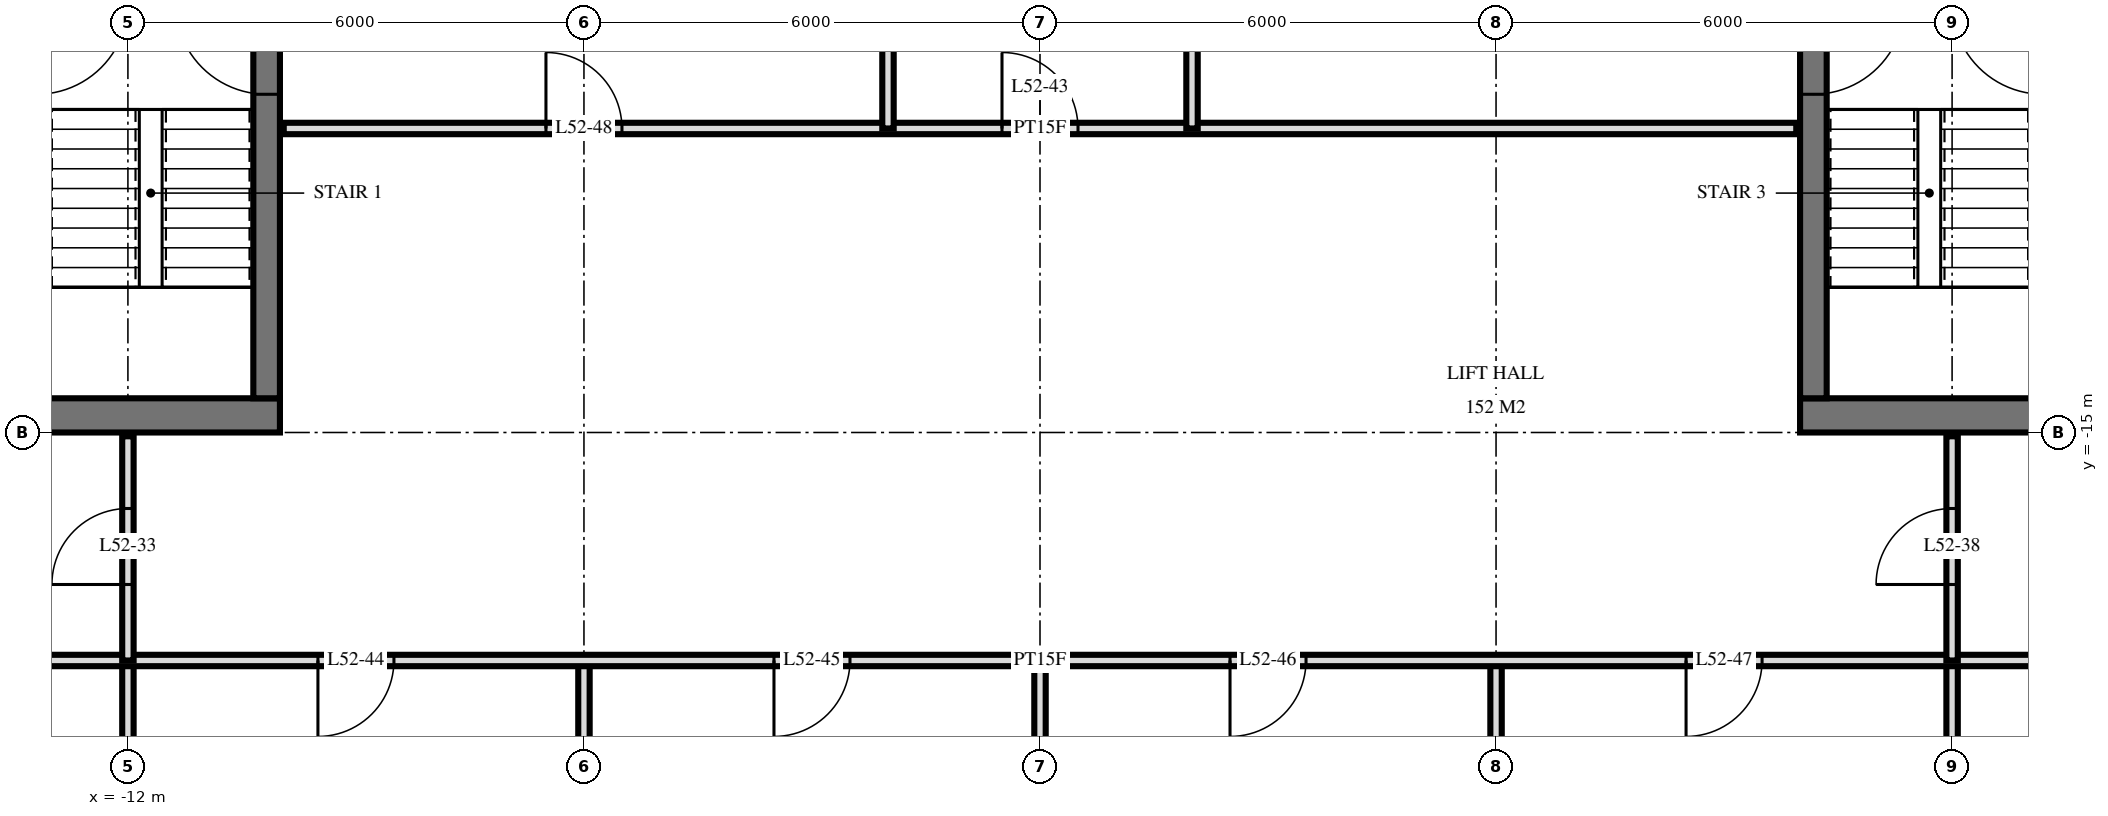
"""IFC4 building model, lengths in metres.
Left out: names, types, materials, properties, quantities, classifications, styles, units other than length and angle.
Written with IfcOpenShell. Run it as: python <this file> out.ifc"""

import sys

from ifc_helpers import new_model, si_unit, direction, frame, frame_2d, origin, place, context, subcontext, project, spatial, rectangle, extrude, element, fill, save


model = new_model("IFC4")
c1 = context("Model", 3, precision=1e-05, world=origin(), true_north=direction((0.0, 1.0)))
c2 = subcontext(c1, "Body", "Model", "MODEL_VIEW")
j1 = project(units=[si_unit("LENGTHUNIT", "METRE"), si_unit("PLANEANGLEUNIT", "RADIAN")], contexts=[c1])
p1 = place(None, origin())
s1 = spatial("IfcSite", under=j1, at=p1, CompositionType="ELEMENT")
p2 = place(p1, origin())
s2 = spatial("IfcBuilding", under=s1, at=p2, CompositionType="ELEMENT")
p3 = place(p2, frame((0.0, 0.0, 201.1)))
s3 = spatial("IfcBuildingStorey", under=s2, at=p3, CompositionType="ELEMENT", Elevation=201.1)
p4 = place(p3, frame((-24.5, -14.775, 0.0), z_axis=(0.0, 0.0, 1.0), x_axis=(1.0, 0.0, 0.0)))
e1 = element("IfcWall", 1, at=p4, inside=s3, PredefinedType="SHEAR", context=c2, shape_type="SweptSolid", body=[
    extrude(rectangle(XDim=14.5, YDim=0.45, at=frame_2d((7.25, 0.0))), origin(), (0.0, 0.0, 1.0), 3.5),
])
p5 = place(p4, frame((6.2, 0.0, 0.0)))
e2 = element("IfcOpeningElement", 2, at=p5, cuts=e1, PredefinedType="OPENING", context=c2, shape_type="SweptSolid", body=[
    extrude(rectangle(XDim=1.2, YDim=2.1, at=frame_2d((0.6, 1.05))), frame((0.0, 0.235, 0.0), z_axis=(0.0, -1.0, 0.0), x_axis=(1.0, 0.0, 0.0)), (0.0, 0.0, 1.0), 0.47),
])
p6 = place(p4, frame((9.25, 0.0, 0.0)))
e3 = element("IfcOpeningElement", 3, at=p6, cuts=e1, PredefinedType="OPENING", context=c2, shape_type="SweptSolid", body=[
    extrude(rectangle(XDim=1.1, YDim=2.1, at=frame_2d((0.55, 1.05))), frame((0.0, 0.235, 0.0), z_axis=(0.0, -1.0, 0.0), x_axis=(1.0, 0.0, 0.0)), (0.0, 0.0, 1.0), 0.47),
])
p7 = place(p4, frame((3.5, 0.0, 0.0)))
e4 = element("IfcOpeningElement", 4, at=p7, cuts=e1, PredefinedType="OPENING", context=c2, shape_type="SweptSolid", body=[
    extrude(rectangle(XDim=0.9, YDim=2.1, at=frame_2d((0.45, 1.05))), frame((0.0, 0.235, 0.0), z_axis=(0.0, -1.0, 0.0), x_axis=(1.0, 0.0, 0.0)), (0.0, 0.0, 1.0), 0.47),
])
p8 = place(p4, frame((1.05, 0.0, 0.0)))
e5 = element("IfcOpeningElement", 5, at=p8, cuts=e1, PredefinedType="OPENING", context=c2, shape_type="SweptSolid", body=[
    extrude(rectangle(XDim=1.0, YDim=2.1, at=frame_2d((0.5, 1.05))), frame((0.0, 0.235, 0.0), z_axis=(0.0, -1.0, 0.0), x_axis=(1.0, 0.0, 0.0)), (0.0, 0.0, 1.0), 0.47),
])
p9 = place(p3, frame((-10.175, -14.55, 0.0), z_axis=(0.0, 0.0, 1.0), x_axis=(0.0, 1.0, 0.0)))
e6 = element("IfcWall", 6, at=p9, inside=s3, PredefinedType="SHEAR", context=c2, shape_type="SweptSolid", body=[
    extrude(rectangle(XDim=14.1, YDim=0.35, at=frame_2d((7.05, 0.0))), origin(), (0.0, 0.0, 1.0), 3.5),
])
p10 = place(p9, frame((8.4, 0.0, 0.0)))
e7 = element("IfcOpeningElement", 7, at=p10, cuts=e6, PredefinedType="OPENING", context=c2, shape_type="SweptSolid", body=[
    extrude(rectangle(XDim=1.4, YDim=2.4, at=frame_2d((0.7, 1.2))), frame((0.0, 0.185, 0.0), z_axis=(0.0, -1.0, 0.0), x_axis=(1.0, 0.0, 0.0)), (0.0, 0.0, 1.0), 0.37),
])
p11 = place(p9, frame((10.0, 0.0, 0.0)))
e8 = element("IfcOpeningElement", 8, at=p11, cuts=e6, PredefinedType="OPENING", context=c2, shape_type="SweptSolid", body=[
    extrude(rectangle(XDim=1.4, YDim=2.4, at=frame_2d((0.7, 1.2))), frame((0.0, 0.185, 0.0), z_axis=(0.0, -1.0, 0.0), x_axis=(1.0, 0.0, 0.0)), (0.0, 0.0, 1.0), 0.37),
])
p12 = place(p9, frame((4.0, 0.0, 0.0)))
e9 = element("IfcOpeningElement", 9, at=p12, cuts=e6, PredefinedType="OPENING", context=c2, shape_type="SweptSolid", body=[
    extrude(rectangle(XDim=1.2, YDim=2.1, at=frame_2d((0.6, 1.05))), frame((0.0, 0.185, 0.0), z_axis=(0.0, -1.0, 0.0), x_axis=(1.0, 0.0, 0.0)), (0.0, 0.0, 1.0), 0.37),
])
p13 = place(p3, frame((10.0, -14.775, 0.0), z_axis=(0.0, 0.0, 1.0), x_axis=(1.0, 0.0, 0.0)))
e10 = element("IfcWall", 10, at=p13, inside=s3, PredefinedType="SHEAR", context=c2, shape_type="SweptSolid", body=[
    extrude(rectangle(XDim=14.5, YDim=0.45, at=frame_2d((7.25, 0.0))), origin(), (0.0, 0.0, 1.0), 3.5),
])
p14 = place(p13, frame((7.1, 0.0, 0.0)))
e11 = element("IfcOpeningElement", 11, at=p14, cuts=e10, PredefinedType="OPENING", context=c2, shape_type="SweptSolid", body=[
    extrude(rectangle(XDim=1.2, YDim=2.1, at=frame_2d((0.6, 1.05))), frame((0.0, 0.235, 0.0), z_axis=(0.0, -1.0, 0.0), x_axis=(1.0, 0.0, 0.0)), (0.0, 0.0, 1.0), 0.47),
])
p15 = place(p13, frame((4.15, 0.0, 0.0)))
e12 = element("IfcOpeningElement", 12, at=p15, cuts=e10, PredefinedType="OPENING", context=c2, shape_type="SweptSolid", body=[
    extrude(rectangle(XDim=1.1, YDim=2.1, at=frame_2d((0.55, 1.05))), frame((0.0, 0.235, 0.0), z_axis=(0.0, -1.0, 0.0), x_axis=(1.0, 0.0, 0.0)), (0.0, 0.0, 1.0), 0.47),
])
p16 = place(p13, frame((10.1, 0.0, 0.0)))
e13 = element("IfcOpeningElement", 13, at=p16, cuts=e10, PredefinedType="OPENING", context=c2, shape_type="SweptSolid", body=[
    extrude(rectangle(XDim=0.9, YDim=2.1, at=frame_2d((0.45, 1.05))), frame((0.0, 0.235, 0.0), z_axis=(0.0, -1.0, 0.0), x_axis=(1.0, 0.0, 0.0)), (0.0, 0.0, 1.0), 0.47),
])
p17 = place(p13, frame((12.45, 0.0, 0.0)))
e14 = element("IfcOpeningElement", 14, at=p17, cuts=e10, PredefinedType="OPENING", context=c2, shape_type="SweptSolid", body=[
    extrude(rectangle(XDim=1.0, YDim=2.1, at=frame_2d((0.5, 1.05))), frame((0.0, 0.235, 0.0), z_axis=(0.0, -1.0, 0.0), x_axis=(1.0, 0.0, 0.0)), (0.0, 0.0, 1.0), 0.47),
])
p18 = place(p3, frame((10.175, -14.55, 0.0), z_axis=(0.0, 0.0, 1.0), x_axis=(0.0, 1.0, 0.0)))
e15 = element("IfcWall", 15, at=p18, inside=s3, PredefinedType="SHEAR", context=c2, shape_type="SweptSolid", body=[
    extrude(rectangle(XDim=14.1, YDim=0.35, at=frame_2d((7.05, 0.0))), origin(), (0.0, 0.0, 1.0), 3.5),
])
p19 = place(p18, frame((8.4, 0.0, 0.0)))
e16 = element("IfcOpeningElement", 16, at=p19, cuts=e15, PredefinedType="OPENING", context=c2, shape_type="SweptSolid", body=[
    extrude(rectangle(XDim=1.4, YDim=2.4, at=frame_2d((0.7, 1.2))), frame((0.0, 0.185, 0.0), z_axis=(0.0, -1.0, 0.0), x_axis=(1.0, 0.0, 0.0)), (0.0, 0.0, 1.0), 0.37),
])
p20 = place(p18, frame((10.0, 0.0, 0.0)))
e17 = element("IfcOpeningElement", 17, at=p20, cuts=e15, PredefinedType="OPENING", context=c2, shape_type="SweptSolid", body=[
    extrude(rectangle(XDim=1.4, YDim=2.4, at=frame_2d((0.7, 1.2))), frame((0.0, 0.185, 0.0), z_axis=(0.0, -1.0, 0.0), x_axis=(1.0, 0.0, 0.0)), (0.0, 0.0, 1.0), 0.37),
])
p21 = place(p18, frame((4.0, 0.0, 0.0)))
e18 = element("IfcOpeningElement", 18, at=p21, cuts=e15, PredefinedType="OPENING", context=c2, shape_type="SweptSolid", body=[
    extrude(rectangle(XDim=1.2, YDim=2.1, at=frame_2d((0.6, 1.05))), frame((0.0, 0.185, 0.0), z_axis=(0.0, -1.0, 0.0), x_axis=(1.0, 0.0, 0.0)), (0.0, 0.0, 1.0), 0.37),
])
p22 = place(p3, frame((12.0, -18.0, 0.0), z_axis=(0.0, 0.0, 1.0), x_axis=(0.0, 1.0, 0.0)))
e19 = element("IfcWall", 19, at=p22, inside=s3, PredefinedType="PARTITIONING", context=c2, shape_type="SweptSolid", body=[
    extrude(rectangle(XDim=2.95, YDim=0.15, at=frame_2d((1.475, 0.0))), origin(), (0.0, 0.0, 1.0), 3.22),
])
p23 = place(p22, frame((1.0, 0.0, 0.0)))
e20 = element("IfcOpeningElement", 20, at=p23, cuts=e19, PredefinedType="OPENING", context=c2, shape_type="SweptSolid", body=[
    extrude(rectangle(XDim=1.0, YDim=2.1, at=frame_2d((0.5, 1.05))), frame((0.0, 0.085, 0.0), z_axis=(0.0, -1.0, 0.0), x_axis=(1.0, 0.0, 0.0)), (0.0, 0.0, 1.0), 0.17),
])
for number, where, z_axis, x_axis in (
    (21, (12.0, -29.22, 0.0), (0.0, 0.0, 1.0), (0.0, 1.0, 0.0)),
    (22, (6.0, -29.22, 0.0), (0.0, 0.0, 1.0), (0.0, 1.0, 0.0)),
):
    element("IfcWall", number, at=place(p3, frame(where, z_axis=z_axis, x_axis=x_axis)), inside=s3, PredefinedType="PARTITIONING", context=c2, shape_type="SweptSolid", body=[
        extrude(rectangle(XDim=11.22, YDim=0.15, at=frame_2d((5.61, 0.0))), origin(), (0.0, 0.0, 1.0), 3.22),
    ])
p24 = place(p3, frame((2.0, -11.0, 0.0), z_axis=(0.0, 0.0, 1.0), x_axis=(0.0, 1.0, 0.0)))
e23 = element("IfcWall", 23, at=p24, inside=s3, PredefinedType="PARTITIONING", context=c2, shape_type="SweptSolid", body=[
    extrude(rectangle(XDim=4.0, YDim=0.15, at=frame_2d((2.0, 0.0))), origin(), (0.0, 0.0, 1.0), 3.22),
])
p25 = place(p3, frame((0.0, -29.22, 0.0), z_axis=(0.0, 0.0, 1.0), x_axis=(0.0, 1.0, 0.0)))
e24 = element("IfcWall", 24, at=p25, inside=s3, PredefinedType="PARTITIONING", context=c2, shape_type="SweptSolid", body=[
    extrude(rectangle(XDim=11.22, YDim=0.15, at=frame_2d((5.61, 0.0))), origin(), (0.0, 0.0, 1.0), 3.22),
])
p26 = place(p3, frame((-2.0, -11.0, 0.0), z_axis=(0.0, 0.0, 1.0), x_axis=(0.0, 1.0, 0.0)))
e25 = element("IfcWall", 25, at=p26, inside=s3, PredefinedType="PARTITIONING", context=c2, shape_type="SweptSolid", body=[
    extrude(rectangle(XDim=4.0, YDim=0.15, at=frame_2d((2.0, 0.0))), origin(), (0.0, 0.0, 1.0), 3.22),
])
p27 = place(p3, frame((-6.0, -29.22, 0.0), z_axis=(0.0, 0.0, 1.0), x_axis=(0.0, 1.0, 0.0)))
e26 = element("IfcWall", 26, at=p27, inside=s3, PredefinedType="PARTITIONING", context=c2, shape_type="SweptSolid", body=[
    extrude(rectangle(XDim=11.22, YDim=0.15, at=frame_2d((5.61, 0.0))), origin(), (0.0, 0.0, 1.0), 3.22),
])
p28 = place(p3, frame((-12.0, -18.0, 0.0), z_axis=(0.0, 0.0, 1.0), x_axis=(0.0, 1.0, 0.0)))
e27 = element("IfcWall", 27, at=p28, inside=s3, PredefinedType="PARTITIONING", context=c2, shape_type="SweptSolid", body=[
    extrude(rectangle(XDim=2.95, YDim=0.15, at=frame_2d((1.475, 0.0))), origin(), (0.0, 0.0, 1.0), 3.22),
])
p29 = place(p28, frame((1.0, 0.0, 0.0)))
e28 = element("IfcOpeningElement", 28, at=p29, cuts=e27, PredefinedType="OPENING", context=c2, shape_type="SweptSolid", body=[
    extrude(rectangle(XDim=1.0, YDim=2.1, at=frame_2d((0.5, 1.05))), frame((0.0, 0.085, 0.0), z_axis=(0.0, -1.0, 0.0), x_axis=(1.0, 0.0, 0.0)), (0.0, 0.0, 1.0), 0.17),
])
p30 = place(p3, frame((-12.0, -29.22, 0.0), z_axis=(0.0, 0.0, 1.0), x_axis=(0.0, 1.0, 0.0)))
e29 = element("IfcWall", 29, at=p30, inside=s3, PredefinedType="PARTITIONING", context=c2, shape_type="SweptSolid", body=[
    extrude(rectangle(XDim=11.22, YDim=0.15, at=frame_2d((5.61, 0.0))), origin(), (0.0, 0.0, 1.0), 3.22),
])
p31 = place(p3, frame((-26.82, -18.0, 0.0), z_axis=(0.0, 0.0, 1.0), x_axis=(1.0, 0.0, 0.0)))
e30 = element("IfcWall", 30, at=p31, inside=s3, PredefinedType="PARTITIONING", context=c2, shape_type="SweptSolid", body=[
    extrude(rectangle(XDim=53.64, YDim=0.15, at=frame_2d((26.82, 0.0))), origin(), (0.0, 0.0, 1.0), 3.22),
])
p32 = place(p31, frame((11.97, 0.0, 0.0)))
e31 = element("IfcOpeningElement", 31, at=p32, cuts=e30, PredefinedType="OPENING", context=c2, shape_type="SweptSolid", body=[
    extrude(rectangle(XDim=1.0, YDim=2.1, at=frame_2d((0.5, 1.05))), frame((0.0, 0.085, 0.0), z_axis=(0.0, -1.0, 0.0), x_axis=(1.0, 0.0, 0.0)), (0.0, 0.0, 1.0), 0.17),
])
p33 = place(p31, frame((3.92, 0.0, 0.0)))
e32 = element("IfcOpeningElement", 32, at=p33, cuts=e30, PredefinedType="OPENING", context=c2, shape_type="SweptSolid", body=[
    extrude(rectangle(XDim=1.0, YDim=2.1, at=frame_2d((0.5, 1.05))), frame((0.0, 0.085, 0.0), z_axis=(0.0, -1.0, 0.0), x_axis=(1.0, 0.0, 0.0)), (0.0, 0.0, 1.0), 0.17),
])
p34 = place(p31, frame((5.72, 0.0, 0.0)))
e33 = element("IfcOpeningElement", 33, at=p34, cuts=e30, PredefinedType="OPENING", context=c2, shape_type="SweptSolid", body=[
    extrude(rectangle(XDim=1.0, YDim=2.1, at=frame_2d((0.5, 1.05))), frame((0.0, 0.085, 0.0), z_axis=(0.0, -1.0, 0.0), x_axis=(1.0, 0.0, 0.0)), (0.0, 0.0, 1.0), 0.17),
])
p35 = place(p31, frame((40.67, 0.0, 0.0)))
e34 = element("IfcOpeningElement", 34, at=p35, cuts=e30, PredefinedType="OPENING", context=c2, shape_type="SweptSolid", body=[
    extrude(rectangle(XDim=1.0, YDim=2.1, at=frame_2d((0.5, 1.05))), frame((0.0, 0.085, 0.0), z_axis=(0.0, -1.0, 0.0), x_axis=(1.0, 0.0, 0.0)), (0.0, 0.0, 1.0), 0.17),
])
p36 = place(p31, frame((48.72, 0.0, 0.0)))
e35 = element("IfcOpeningElement", 35, at=p36, cuts=e30, PredefinedType="OPENING", context=c2, shape_type="SweptSolid", body=[
    extrude(rectangle(XDim=1.0, YDim=2.1, at=frame_2d((0.5, 1.05))), frame((0.0, 0.085, 0.0), z_axis=(0.0, -1.0, 0.0), x_axis=(1.0, 0.0, 0.0)), (0.0, 0.0, 1.0), 0.17),
])
p37 = place(p31, frame((46.92, 0.0, 0.0)))
e36 = element("IfcOpeningElement", 36, at=p37, cuts=e30, PredefinedType="OPENING", context=c2, shape_type="SweptSolid", body=[
    extrude(rectangle(XDim=1.0, YDim=2.1, at=frame_2d((0.5, 1.05))), frame((0.0, 0.085, 0.0), z_axis=(0.0, -1.0, 0.0), x_axis=(1.0, 0.0, 0.0)), (0.0, 0.0, 1.0), 0.17),
])
p38 = place(p31, frame((17.32, 0.0, 0.0)))
e37 = element("IfcOpeningElement", 37, at=p38, cuts=e30, PredefinedType="OPENING", context=c2, shape_type="SweptSolid", body=[
    extrude(rectangle(XDim=1.0, YDim=2.1, at=frame_2d((0.5, 1.05))), frame((0.0, 0.085, 0.0), z_axis=(0.0, -1.0, 0.0), x_axis=(1.0, 0.0, 0.0)), (0.0, 0.0, 1.0), 0.17),
])
p39 = place(p31, frame((23.32, 0.0, 0.0)))
e38 = element("IfcOpeningElement", 38, at=p39, cuts=e30, PredefinedType="OPENING", context=c2, shape_type="SweptSolid", body=[
    extrude(rectangle(XDim=1.0, YDim=2.1, at=frame_2d((0.5, 1.05))), frame((0.0, 0.085, 0.0), z_axis=(0.0, -1.0, 0.0), x_axis=(1.0, 0.0, 0.0)), (0.0, 0.0, 1.0), 0.17),
])
p40 = place(p31, frame((29.32, 0.0, 0.0)))
e39 = element("IfcOpeningElement", 39, at=p40, cuts=e30, PredefinedType="OPENING", context=c2, shape_type="SweptSolid", body=[
    extrude(rectangle(XDim=1.0, YDim=2.1, at=frame_2d((0.5, 1.05))), frame((0.0, 0.085, 0.0), z_axis=(0.0, -1.0, 0.0), x_axis=(1.0, 0.0, 0.0)), (0.0, 0.0, 1.0), 0.17),
])
p41 = place(p31, frame((35.32, 0.0, 0.0)))
e40 = element("IfcOpeningElement", 40, at=p41, cuts=e30, PredefinedType="OPENING", context=c2, shape_type="SweptSolid", body=[
    extrude(rectangle(XDim=1.0, YDim=2.1, at=frame_2d((0.5, 1.05))), frame((0.0, 0.085, 0.0), z_axis=(0.0, -1.0, 0.0), x_axis=(1.0, 0.0, 0.0)), (0.0, 0.0, 1.0), 0.17),
])
p42 = place(p3, frame((-9.95, -11.0, 0.0), z_axis=(0.0, 0.0, 1.0), x_axis=(1.0, 0.0, 0.0)))
e41 = element("IfcWall", 41, at=p42, inside=s3, PredefinedType="PARTITIONING", context=c2, shape_type="SweptSolid", body=[
    extrude(rectangle(XDim=19.9, YDim=0.15, at=frame_2d((9.95, 0.0))), origin(), (0.0, 0.0, 1.0), 3.22),
])
p43 = place(p42, frame((9.45, 0.0, 0.0)))
e42 = element("IfcOpeningElement", 42, at=p43, cuts=e41, PredefinedType="OPENING", context=c2, shape_type="SweptSolid", body=[
    extrude(rectangle(XDim=1.0, YDim=2.1, at=frame_2d((0.5, 1.05))), frame((0.0, 0.085, 0.0), z_axis=(0.0, -1.0, 0.0), x_axis=(1.0, 0.0, 0.0)), (0.0, 0.0, 1.0), 0.17),
])
p44 = place(p42, frame((3.45, 0.0, 0.0)))
e43 = element("IfcOpeningElement", 43, at=p44, cuts=e41, PredefinedType="OPENING", context=c2, shape_type="SweptSolid", body=[
    extrude(rectangle(XDim=1.0, YDim=2.1, at=frame_2d((0.5, 1.05))), frame((0.0, 0.085, 0.0), z_axis=(0.0, -1.0, 0.0), x_axis=(1.0, 0.0, 0.0)), (0.0, 0.0, 1.0), 0.17),
])
p45 = place(p12, origin())
e44 = element("IfcDoor", 44, at=p45, inside=s3, OperationType="SINGLE_SWING_LEFT", PredefinedType="DOOR", context=c2, shape_type="SweptSolid", body=[
    extrude(rectangle(XDim=1.2, YDim=2.1, at=frame_2d((0.6, 1.05))), frame((0.0, 0.025, 0.0), z_axis=(0.0, -1.0, 0.0), x_axis=(1.0, 0.0, 0.0)), (0.0, 0.0, 1.0), 0.05),
])
fill(e9, e44)
p46 = place(p21, frame((0.6, 0.0, 0.0), z_axis=(0.0, 0.0, 1.0), x_axis=(-1.0, 0.0, 0.0)))
e45 = element("IfcDoor", 45, at=p46, inside=s3, OperationType="SINGLE_SWING_RIGHT", PredefinedType="DOOR", context=c2, shape_type="SweptSolid", body=[
    extrude(rectangle(XDim=1.2, YDim=2.1, at=frame_2d((0.0, 1.05))), frame((0.0, -0.025, 0.0), z_axis=(0.0, 1.0, 0.0), x_axis=(-1.0, 0.0, 0.0)), (0.0, 0.0, 1.0), 0.05),
])
fill(e18, e45)
p47 = place(p29, origin())
e46 = element("IfcDoor", 46, at=p47, inside=s3, OperationType="SINGLE_SWING_RIGHT", PredefinedType="DOOR", context=c2, shape_type="SweptSolid", body=[
    extrude(rectangle(XDim=1.0, YDim=2.1, at=frame_2d((0.5, 1.05))), frame((0.0, 0.025, 0.0), z_axis=(0.0, -1.0, 0.0), x_axis=(1.0, 0.0, 0.0)), (0.0, 0.0, 1.0), 0.05),
])
fill(e28, e46)
p48 = place(p23, origin())
e47 = element("IfcDoor", 47, at=p48, inside=s3, OperationType="SINGLE_SWING_RIGHT", PredefinedType="DOOR", context=c2, shape_type="SweptSolid", body=[
    extrude(rectangle(XDim=1.0, YDim=2.1, at=frame_2d((0.5, 1.05))), frame((0.0, 0.025, 0.0), z_axis=(0.0, -1.0, 0.0), x_axis=(1.0, 0.0, 0.0)), (0.0, 0.0, 1.0), 0.05),
])
fill(e20, e47)
p49 = place(p43, origin())
e48 = element("IfcDoor", 48, at=p49, inside=s3, OperationType="SINGLE_SWING_RIGHT", PredefinedType="DOOR", context=c2, shape_type="SweptSolid", body=[
    extrude(rectangle(XDim=1.0, YDim=2.1, at=frame_2d((0.5, 1.05))), frame((0.0, 0.025, 0.0), z_axis=(0.0, -1.0, 0.0), x_axis=(1.0, 0.0, 0.0)), (0.0, 0.0, 1.0), 0.05),
])
fill(e42, e48)
p50 = place(p38, frame((0.5, 0.0, 0.0), z_axis=(0.0, 0.0, 1.0), x_axis=(-1.0, 0.0, 0.0)))
e49 = element("IfcDoor", 49, at=p50, inside=s3, OperationType="SINGLE_SWING_LEFT", PredefinedType="DOOR", context=c2, shape_type="SweptSolid", body=[
    extrude(rectangle(XDim=1.0, YDim=2.1, at=frame_2d((0.0, 1.05))), frame((0.0, -0.025, 0.0), z_axis=(0.0, 1.0, 0.0), x_axis=(-1.0, 0.0, 0.0)), (0.0, 0.0, 1.0), 0.05),
])
fill(e37, e49)
p51 = place(p39, frame((0.5, 0.0, 0.0), z_axis=(0.0, 0.0, 1.0), x_axis=(-1.0, 0.0, 0.0)))
e50 = element("IfcDoor", 50, at=p51, inside=s3, OperationType="SINGLE_SWING_LEFT", PredefinedType="DOOR", context=c2, shape_type="SweptSolid", body=[
    extrude(rectangle(XDim=1.0, YDim=2.1, at=frame_2d((0.0, 1.05))), frame((0.0, -0.025, 0.0), z_axis=(0.0, 1.0, 0.0), x_axis=(-1.0, 0.0, 0.0)), (0.0, 0.0, 1.0), 0.05),
])
fill(e38, e50)
p52 = place(p40, frame((0.5, 0.0, 0.0), z_axis=(0.0, 0.0, 1.0), x_axis=(-1.0, 0.0, 0.0)))
e51 = element("IfcDoor", 51, at=p52, inside=s3, OperationType="SINGLE_SWING_LEFT", PredefinedType="DOOR", context=c2, shape_type="SweptSolid", body=[
    extrude(rectangle(XDim=1.0, YDim=2.1, at=frame_2d((0.0, 1.05))), frame((0.0, -0.025, 0.0), z_axis=(0.0, 1.0, 0.0), x_axis=(-1.0, 0.0, 0.0)), (0.0, 0.0, 1.0), 0.05),
])
fill(e39, e51)
p53 = place(p41, frame((0.5, 0.0, 0.0), z_axis=(0.0, 0.0, 1.0), x_axis=(-1.0, 0.0, 0.0)))
e52 = element("IfcDoor", 52, at=p53, inside=s3, OperationType="SINGLE_SWING_LEFT", PredefinedType="DOOR", context=c2, shape_type="SweptSolid", body=[
    extrude(rectangle(XDim=1.0, YDim=2.1, at=frame_2d((0.0, 1.05))), frame((0.0, -0.025, 0.0), z_axis=(0.0, 1.0, 0.0), x_axis=(-1.0, 0.0, 0.0)), (0.0, 0.0, 1.0), 0.05),
])
fill(e40, e52)
p54 = place(p44, origin())
e53 = element("IfcDoor", 53, at=p54, inside=s3, OperationType="SINGLE_SWING_RIGHT", PredefinedType="DOOR", context=c2, shape_type="SweptSolid", body=[
    extrude(rectangle(XDim=1.0, YDim=2.1, at=frame_2d((0.5, 1.05))), frame((0.0, 0.025, 0.0), z_axis=(0.0, -1.0, 0.0), x_axis=(1.0, 0.0, 0.0)), (0.0, 0.0, 1.0), 0.05),
])
fill(e43, e53)
save(model, sys.argv[1])
